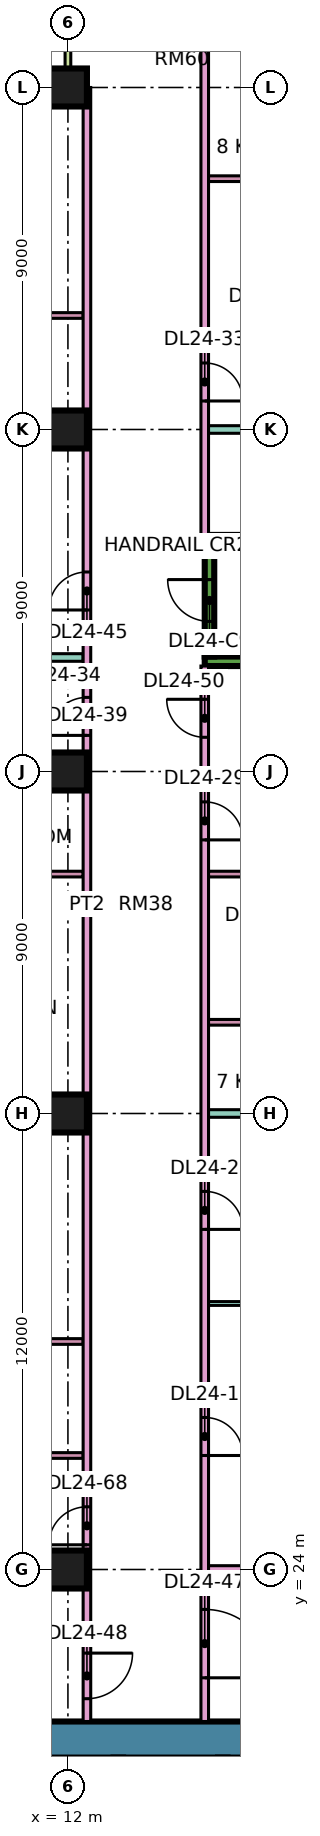
"""IFC4 building model, lengths in metres.
Left out: names, types, materials, properties, quantities, classifications, styles, units other than length and angle.
Written with IfcOpenShell. Run it as: python <this file> out.ifc"""

import sys

from ifc_helpers import new_model, si_unit, direction, frame, frame_2d, origin, origin_2d, place, context, subcontext, project, spatial, rectangle, extrude, element, fill, save


model = new_model("IFC4")
c1 = context("Model", 3, precision=1e-05, world=origin(), true_north=direction((0.0, 1.0)))
c2 = subcontext(c1, "Body", "Model", "MODEL_VIEW")
j1 = project(units=[si_unit("LENGTHUNIT", "METRE"), si_unit("PLANEANGLEUNIT", "RADIAN")], contexts=[c1])
p1 = place(None, origin())
s1 = spatial("IfcSite", under=j1, at=p1, CompositionType="ELEMENT")
p2 = place(p1, origin())
s2 = spatial("IfcBuilding", under=s1, at=p2, CompositionType="ELEMENT")
p3 = place(p2, frame((0.0, 0.0, 106.9)))
s3 = spatial("IfcBuildingStorey", under=s2, at=p3, CompositionType="ELEMENT", Elevation=106.9)
for number, where, z_axis, x_axis in (
    (1, (12.0, 24.0, 0.0), (0.0, 0.0, 1.0), (1.0, 0.0, 0.0)),
    (2, (12.0, 36.0, 0.0), (0.0, 0.0, 1.0), (1.0, 0.0, 0.0)),
    (3, (12.0, 45.0, 0.0), (0.0, 0.0, 1.0), (1.0, 0.0, 0.0)),
    (4, (12.0, 54.0, 0.0), (0.0, 0.0, 1.0), (1.0, 0.0, 0.0)),
    (5, (12.0, 63.0, 0.0), (0.0, 0.0, 1.0), (1.0, 0.0, 0.0)),
):
    element("IfcColumn", number, at=place(p3, frame(where, z_axis=z_axis, x_axis=x_axis)), inside=s3, PredefinedType="COLUMN", context=c2, shape_type="SweptSolid", body=[
        extrude(rectangle(XDim=1.0, YDim=1.0, at=origin_2d()), origin(), (0.0, 0.0, 1.0), 3.75),
    ])
p4 = place(p3, frame((9.0, 19.525, 0.0), z_axis=(0.0, 0.0, 1.0), x_axis=(1.0, 0.0, 0.0)))
e6 = element("IfcWall", 6, at=p4, inside=s3, PredefinedType="SHEAR", context=c2, shape_type="SweptSolid", body=[
    extrude(rectangle(XDim=25.0, YDim=0.95, at=frame_2d((12.5, 0.0))), origin(), (0.0, 0.0, 1.0), 3.75),
])
p5 = place(p4, frame((19.1, 0.0, 0.0)))
e7 = element("IfcOpeningElement", 7, at=p5, cuts=e6, PredefinedType="OPENING", context=c2, shape_type="SweptSolid", body=[
    extrude(rectangle(XDim=1.8, YDim=2.4, at=frame_2d((0.9, 1.2))), frame((0.0, 0.485, 0.0), z_axis=(0.0, -1.0, 0.0), x_axis=(1.0, 0.0, 0.0)), (0.0, 0.0, 1.0), 0.97),
])
for number, where, z_axis, x_axis in (
    (8, (15.6, 47.9, 0.0), (0.0, 0.0, 1.0), (1.0, 0.0, 0.0)),
    (9, (15.6, 51.1, 0.0), (0.0, 0.0, 1.0), (1.0, 0.0, 0.0)),
):
    element("IfcWall", number, at=place(p3, frame(where, z_axis=z_axis, x_axis=x_axis)), inside=s3, PredefinedType="SHEAR", context=c2, shape_type="SweptSolid", body=[
        extrude(rectangle(XDim=7.0, YDim=0.25, at=frame_2d((3.5, 0.0))), origin(), (0.0, 0.0, 1.0), 3.75),
    ])
p6 = place(p3, frame((15.725, 48.025, 0.0), z_axis=(0.0, 0.0, 1.0), x_axis=(0.0, 1.0, 0.0)))
e10 = element("IfcWall", 10, at=p6, inside=s3, PredefinedType="SHEAR", context=c2, shape_type="SweptSolid", body=[
    extrude(rectangle(XDim=2.95, YDim=0.25, at=frame_2d((1.475, 0.0))), origin(), (0.0, 0.0, 1.0), 3.75),
])
p7 = place(p6, frame((0.925, 0.0, 0.0)))
e11 = element("IfcOpeningElement", 11, at=p7, cuts=e10, PredefinedType="OPENING", context=c2, shape_type="SweptSolid", body=[
    extrude(rectangle(XDim=1.1, YDim=2.2, at=frame_2d((0.55, 1.1))), frame((0.0, 0.135, 0.0), z_axis=(0.0, -1.0, 0.0), x_axis=(1.0, 0.0, 0.0)), (0.0, 0.0, 1.0), 0.27),
])
p8 = place(p3, frame((11.925, 63.0, 0.0), z_axis=(0.0, 0.0, 1.0), x_axis=(-1.0, 0.0, 0.0)))
e12 = element("IfcWall", 12, at=p8, inside=s3, PredefinedType="SOLIDWALL", context=c2, shape_type="SweptSolid", body=[
    extrude(rectangle(XDim=10.35, YDim=0.15, at=frame_2d((5.175, 0.0))), origin(), (0.0, 0.0, 1.0), 3.35),
])
p9 = place(p8, frame((1.175, 0.0, 0.45)))
e13 = element("IfcOpeningElement", 13, at=p9, cuts=e12, PredefinedType="OPENING", context=c2, shape_type="SweptSolid", body=[
    extrude(rectangle(XDim=3.0, YDim=2.4, at=frame_2d((1.5, 1.2))), frame((0.0, 0.085, 0.0), z_axis=(0.0, -1.0, 0.0), x_axis=(1.0, 0.0, 0.0)), (0.0, 0.0, 1.0), 0.17),
])
p10 = place(p8, frame((7.288, 0.0, 0.0)))
e14 = element("IfcOpeningElement", 14, at=p10, cuts=e12, PredefinedType="OPENING", context=c2, shape_type="SweptSolid", body=[
    extrude(rectangle(XDim=1.8, YDim=2.4, at=frame_2d((0.9, 1.2))), frame((0.0, 0.085, 0.0), z_axis=(0.0, -1.0, 0.0), x_axis=(1.0, 0.0, 0.0)), (0.0, 0.0, 1.0), 0.17),
])
p11 = place(p3, frame((12.0, 64.5, 0.0), z_axis=(0.0, 0.0, 1.0), x_axis=(0.0, -1.0, 0.0)))
e15 = element("IfcWall", 15, at=p11, inside=s3, PredefinedType="SOLIDWALL", context=c2, shape_type="SweptSolid", body=[
    extrude(rectangle(XDim=1.5, YDim=0.15, at=frame_2d((0.75, 0.0))), origin(), (0.0, 0.0, 1.0), 3.35),
])
p12 = place(p3, frame((-1.35, 22.4, 0.0), z_axis=(0.0, 0.0, 1.0), x_axis=(1.0, 0.0, 0.0)))
e16 = element("IfcWall", 16, at=p12, inside=s3, PredefinedType="PARTITIONING", context=c2, shape_type="SweptSolid", body=[
    extrude(rectangle(XDim=13.75, YDim=0.2, at=frame_2d((6.875, 0.0))), origin(), (0.0, 0.0, 1.0), 3.35),
])
p13 = place(p3, frame((0.0, 36.0, 0.0), z_axis=(0.0, 0.0, 1.0), x_axis=(1.0, 0.0, 0.0)))
e17 = element("IfcWall", 17, at=p13, inside=s3, PredefinedType="PARTITIONING", context=c2, shape_type="SweptSolid", body=[
    extrude(rectangle(XDim=12.4, YDim=0.2, at=frame_2d((6.2, 0.0))), origin(), (0.0, 0.0, 1.0), 3.35),
])
p14 = place(p3, frame((0.0, 48.0, 0.0), z_axis=(0.0, 0.0, 1.0), x_axis=(1.0, 0.0, 0.0)))
e18 = element("IfcWall", 18, at=p14, inside=s3, PredefinedType="PARTITIONING", context=c2, shape_type="SweptSolid", body=[
    extrude(rectangle(XDim=12.4, YDim=0.2, at=frame_2d((6.2, 0.0))), origin(), (0.0, 0.0, 1.0), 3.35),
])
for number, where, z_axis, x_axis in (
    (19, (7.175, 27.0, 0.0), (0.0, 0.0, 1.0), (1.0, 0.0, 0.0)),
    (20, (7.175, 30.0, 0.0), (0.0, 0.0, 1.0), (1.0, 0.0, 0.0)),
    (21, (7.175, 53.7, 0.0), (0.0, 0.0, 1.0), (1.0, 0.0, 0.0)),
    (22, (7.175, 57.0, 0.0), (0.0, 0.0, 1.0), (1.0, 0.0, 0.0)),
):
    element("IfcWall", number, at=place(p3, frame(where, z_axis=z_axis, x_axis=x_axis)), inside=s3, PredefinedType="PARTITIONING", context=c2, shape_type="SweptSolid", body=[
        extrude(rectangle(XDim=5.225, YDim=0.15, at=frame_2d((2.612, 0.0))), origin(), (0.0, 0.0, 1.0), 3.35),
    ])
p15 = place(p3, frame((8.375, 42.3, 0.0), z_axis=(0.0, 0.0, 1.0), x_axis=(1.0, 0.0, 0.0)))
e23 = element("IfcWall", 23, at=p15, inside=s3, PredefinedType="PARTITIONING", context=c2, shape_type="SweptSolid", body=[
    extrude(rectangle(XDim=4.025, YDim=0.15, at=frame_2d((2.012, 0.0))), origin(), (0.0, 0.0, 1.0), 3.35),
])
p16 = place(p3, frame((8.375, 45.0, 0.0), z_axis=(0.0, 0.0, 1.0), x_axis=(1.0, 0.0, 0.0)))
e24 = element("IfcWall", 24, at=p16, inside=s3, PredefinedType="PARTITIONING", context=c2, shape_type="SweptSolid", body=[
    extrude(rectangle(XDim=4.025, YDim=0.15, at=frame_2d((2.012, 0.0))), origin(), (0.0, 0.0, 1.0), 3.35),
])
p17 = place(p16, frame((1.575, 0.0, 0.0)))
e25 = element("IfcOpeningElement", 25, at=p17, cuts=e24, PredefinedType="OPENING", context=c2, shape_type="SweptSolid", body=[
    extrude(rectangle(XDim=0.8, YDim=2.1, at=frame_2d((0.4, 1.05))), frame((0.0, 0.085, 0.0), z_axis=(0.0, -1.0, 0.0), x_axis=(1.0, 0.0, 0.0)), (0.0, 0.0, 1.0), 0.17),
])
p18 = place(p3, frame((12.5, 20.0, 0.0), z_axis=(0.0, 0.0, 1.0), x_axis=(0.0, 1.0, 0.0)))
e26 = element("IfcWall", 26, at=p18, inside=s3, PredefinedType="PARTITIONING", context=c2, shape_type="SweptSolid", body=[
    extrude(rectangle(XDim=43.0, YDim=0.2, at=frame_2d((21.5, 0.0))), origin(), (0.0, 0.0, 1.0), 3.35),
])
p19 = place(p18, frame((25.95, 0.0, 0.0)))
e27 = element("IfcOpeningElement", 27, at=p19, cuts=e26, PredefinedType="OPENING", context=c2, shape_type="SweptSolid", body=[
    extrude(rectangle(XDim=1.0, YDim=2.1, at=frame_2d((0.5, 1.05))), frame((0.0, 0.11, 0.0), z_axis=(0.0, -1.0, 0.0), x_axis=(1.0, 0.0, 0.0)), (0.0, 0.0, 1.0), 0.22),
])
p20 = place(p18, frame((29.25, 0.0, 0.0)))
e28 = element("IfcOpeningElement", 28, at=p20, cuts=e26, PredefinedType="OPENING", context=c2, shape_type="SweptSolid", body=[
    extrude(rectangle(XDim=1.0, YDim=2.1, at=frame_2d((0.5, 1.05))), frame((0.0, 0.11, 0.0), z_axis=(0.0, -1.0, 0.0), x_axis=(1.0, 0.0, 0.0)), (0.0, 0.0, 1.0), 0.22),
])
p21 = place(p18, frame((0.6, 0.0, 0.0)))
e29 = element("IfcOpeningElement", 29, at=p21, cuts=e26, PredefinedType="OPENING", context=c2, shape_type="SweptSolid", body=[
    extrude(rectangle(XDim=1.2, YDim=2.1, at=frame_2d((0.6, 1.05))), frame((0.0, 0.11, 0.0), z_axis=(0.0, -1.0, 0.0), x_axis=(1.0, 0.0, 0.0)), (0.0, 0.0, 1.0), 0.22),
])
p22 = place(p18, frame((4.65, 0.0, 0.0)))
e30 = element("IfcOpeningElement", 30, at=p22, cuts=e26, PredefinedType="OPENING", context=c2, shape_type="SweptSolid", body=[
    extrude(rectangle(XDim=1.0, YDim=2.1, at=frame_2d((0.5, 1.05))), frame((0.0, 0.11, 0.0), z_axis=(0.0, -1.0, 0.0), x_axis=(1.0, 0.0, 0.0)), (0.0, 0.0, 1.0), 0.22),
])
p23 = place(p3, frame((15.6, 20.0, 0.0), z_axis=(0.0, 0.0, 1.0), x_axis=(0.0, 1.0, 0.0)))
e31 = element("IfcWall", 31, at=p23, inside=s3, PredefinedType="PARTITIONING", context=c2, shape_type="SweptSolid", body=[
    extrude(rectangle(XDim=27.775, YDim=0.2, at=frame_2d((13.887, 0.0))), origin(), (0.0, 0.0, 1.0), 3.35),
])
p24 = place(p23, frame((7.0, 0.0, 0.0)))
e32 = element("IfcOpeningElement", 32, at=p24, cuts=e31, PredefinedType="OPENING", context=c2, shape_type="SweptSolid", body=[
    extrude(rectangle(XDim=1.0, YDim=2.1, at=frame_2d((0.5, 1.05))), frame((0.0, 0.11, 0.0), z_axis=(0.0, -1.0, 0.0), x_axis=(1.0, 0.0, 0.0)), (0.0, 0.0, 1.0), 0.22),
])
p25 = place(p23, frame((12.95, 0.0, 0.0)))
e33 = element("IfcOpeningElement", 33, at=p25, cuts=e31, PredefinedType="OPENING", context=c2, shape_type="SweptSolid", body=[
    extrude(rectangle(XDim=1.0, YDim=2.1, at=frame_2d((0.5, 1.05))), frame((0.0, 0.11, 0.0), z_axis=(0.0, -1.0, 0.0), x_axis=(1.0, 0.0, 0.0)), (0.0, 0.0, 1.0), 0.22),
])
p26 = place(p23, frame((23.2, 0.0, 0.0)))
e34 = element("IfcOpeningElement", 34, at=p26, cuts=e31, PredefinedType="OPENING", context=c2, shape_type="SweptSolid", body=[
    extrude(rectangle(XDim=1.0, YDim=2.1, at=frame_2d((0.5, 1.05))), frame((0.0, 0.11, 0.0), z_axis=(0.0, -1.0, 0.0), x_axis=(1.0, 0.0, 0.0)), (0.0, 0.0, 1.0), 0.22),
])
p27 = place(p23, frame((1.15, 0.0, 0.0)))
e35 = element("IfcOpeningElement", 35, at=p27, cuts=e31, PredefinedType="OPENING", context=c2, shape_type="SweptSolid", body=[
    extrude(rectangle(XDim=1.8, YDim=2.1, at=frame_2d((0.9, 1.05))), frame((0.0, 0.11, 0.0), z_axis=(0.0, -1.0, 0.0), x_axis=(1.0, 0.0, 0.0)), (0.0, 0.0, 1.0), 0.22),
])
p28 = place(p23, frame((25.9, 0.0, 0.0)))
e36 = element("IfcOpeningElement", 36, at=p28, cuts=e31, PredefinedType="OPENING", context=c2, shape_type="SweptSolid", body=[
    extrude(rectangle(XDim=1.0, YDim=2.1, at=frame_2d((0.5, 1.05))), frame((0.0, 0.11, 0.0), z_axis=(0.0, -1.0, 0.0), x_axis=(1.0, 0.0, 0.0)), (0.0, 0.0, 1.0), 0.22),
])
p29 = place(p3, frame((15.6, 51.225, 0.0), z_axis=(0.0, 0.0, 1.0), x_axis=(0.0, 1.0, 0.0)))
e37 = element("IfcWall", 37, at=p29, inside=s3, PredefinedType="PARTITIONING", context=c2, shape_type="SweptSolid", body=[
    extrude(rectangle(XDim=13.125, YDim=0.2, at=frame_2d((6.562, 0.0))), origin(), (0.0, 0.0, 1.0), 3.35),
])
p30 = place(p29, frame((3.525, 0.0, 0.0)))
e38 = element("IfcOpeningElement", 38, at=p30, cuts=e37, PredefinedType="OPENING", context=c2, shape_type="SweptSolid", body=[
    extrude(rectangle(XDim=1.0, YDim=2.1, at=frame_2d((0.5, 1.05))), frame((0.0, 0.11, 0.0), z_axis=(0.0, -1.0, 0.0), x_axis=(1.0, 0.0, 0.0)), (0.0, 0.0, 1.0), 0.22),
])
p31 = place(p3, frame((15.7, 24.0, 0.0), z_axis=(0.0, 0.0, 1.0), x_axis=(1.0, 0.0, 0.0)))
e39 = element("IfcWall", 39, at=p31, inside=s3, PredefinedType="PARTITIONING", context=c2, shape_type="SweptSolid", body=[
    extrude(rectangle(XDim=5.8, YDim=0.2, at=frame_2d((2.9, 0.0))), origin(), (0.0, 0.0, 1.0), 3.35),
])
p32 = place(p3, frame((15.7, 31.0, 0.0), z_axis=(0.0, 0.0, 1.0), x_axis=(1.0, 0.0, 0.0)))
e40 = element("IfcWall", 40, at=p32, inside=s3, PredefinedType="PARTITIONING", context=c2, shape_type="SweptSolid", body=[
    extrude(rectangle(XDim=5.8, YDim=0.1, at=frame_2d((2.9, 0.0))), origin(), (0.0, 0.0, 1.0), 3.35),
])
p33 = place(p3, frame((15.7, 36.0, 0.0), z_axis=(0.0, 0.0, 1.0), x_axis=(1.0, 0.0, 0.0)))
e41 = element("IfcWall", 41, at=p33, inside=s3, PredefinedType="PARTITIONING", context=c2, shape_type="SweptSolid", body=[
    extrude(rectangle(XDim=8.3, YDim=0.2, at=frame_2d((4.15, 0.0))), origin(), (0.0, 0.0, 1.0), 3.35),
])
p34 = place(p3, frame((15.7, 38.4, 0.0), z_axis=(0.0, 0.0, 1.0), x_axis=(1.0, 0.0, 0.0)))
e42 = element("IfcWall", 42, at=p34, inside=s3, PredefinedType="PARTITIONING", context=c2, shape_type="SweptSolid", body=[
    extrude(rectangle(XDim=3.125, YDim=0.15, at=frame_2d((1.562, 0.0))), origin(), (0.0, 0.0, 1.0), 3.35),
])
p35 = place(p3, frame((15.7, 42.3, 0.0), z_axis=(0.0, 0.0, 1.0), x_axis=(1.0, 0.0, 0.0)))
e43 = element("IfcWall", 43, at=p35, inside=s3, PredefinedType="PARTITIONING", context=c2, shape_type="SweptSolid", body=[
    extrude(rectangle(XDim=3.125, YDim=0.15, at=frame_2d((1.562, 0.0))), origin(), (0.0, 0.0, 1.0), 3.35),
])
p36 = place(p35, frame((1.1, 0.0, 0.0)))
e44 = element("IfcOpeningElement", 44, at=p36, cuts=e43, PredefinedType="OPENING", context=c2, shape_type="SweptSolid", body=[
    extrude(rectangle(XDim=0.8, YDim=2.1, at=frame_2d((0.4, 1.05))), frame((0.0, 0.085, 0.0), z_axis=(0.0, -1.0, 0.0), x_axis=(1.0, 0.0, 0.0)), (0.0, 0.0, 1.0), 0.17),
])
p37 = place(p3, frame((15.7, 45.0, 0.0), z_axis=(0.0, 0.0, 1.0), x_axis=(1.0, 0.0, 0.0)))
e45 = element("IfcWall", 45, at=p37, inside=s3, PredefinedType="PARTITIONING", context=c2, shape_type="SweptSolid", body=[
    extrude(rectangle(XDim=8.3, YDim=0.2, at=frame_2d((4.15, 0.0))), origin(), (0.0, 0.0, 1.0), 3.35),
])
p38 = place(p3, frame((15.7, 54.0, 0.0), z_axis=(0.0, 0.0, 1.0), x_axis=(1.0, 0.0, 0.0)))
e46 = element("IfcWall", 46, at=p38, inside=s3, PredefinedType="PARTITIONING", context=c2, shape_type="SweptSolid", body=[
    extrude(rectangle(XDim=8.226, YDim=0.2, at=frame_2d((4.113, 0.0))), origin(), (0.0, 0.0, 1.0), 3.35),
])
p39 = place(p3, frame((15.7, 56.4, 0.0), z_axis=(0.0, 0.0, 1.0), x_axis=(1.0, 0.0, 0.0)))
e47 = element("IfcWall", 47, at=p39, inside=s3, PredefinedType="PARTITIONING", context=c2, shape_type="SweptSolid", body=[
    extrude(rectangle(XDim=3.125, YDim=0.15, at=frame_2d((1.562, 0.0))), origin(), (0.0, 0.0, 1.0), 3.35),
])
p40 = place(p39, frame((1.2, 0.0, 0.0)))
e48 = element("IfcOpeningElement", 48, at=p40, cuts=e47, PredefinedType="OPENING", context=c2, shape_type="SweptSolid", body=[
    extrude(rectangle(XDim=0.8, YDim=2.1, at=frame_2d((0.4, 1.05))), frame((0.0, 0.085, 0.0), z_axis=(0.0, -1.0, 0.0), x_axis=(1.0, 0.0, 0.0)), (0.0, 0.0, 1.0), 0.17),
])
p41 = place(p3, frame((15.7, 60.6, 0.0), z_axis=(0.0, 0.0, 1.0), x_axis=(1.0, 0.0, 0.0)))
e49 = element("IfcWall", 49, at=p41, inside=s3, PredefinedType="PARTITIONING", context=c2, shape_type="SweptSolid", body=[
    extrude(rectangle(XDim=3.125, YDim=0.15, at=frame_2d((1.562, 0.0))), origin(), (0.0, 0.0, 1.0), 3.35),
])
p42 = place(p7, frame((1.1, 0.0, 0.0), z_axis=(0.0, 0.0, 1.0), x_axis=(-1.0, 0.0, 0.0)))
e50 = element("IfcDoor", 50, at=p42, inside=s3, OperationType="SINGLE_SWING_RIGHT", PredefinedType="DOOR", context=c2, shape_type="SweptSolid", body=[
    extrude(rectangle(XDim=1.1, YDim=2.2, at=frame_2d((0.55, 1.1))), frame((0.0, 0.025, 0.0), z_axis=(0.0, -1.0, 0.0), x_axis=(1.0, 0.0, 0.0)), (0.0, 0.0, 1.0), 0.05),
])
fill(e11, e50)
p43 = place(p24, frame((1.0, 0.0, 0.0), z_axis=(0.0, 0.0, 1.0), x_axis=(-1.0, 0.0, 0.0)))
e51 = element("IfcDoor", 51, at=p43, inside=s3, OperationType="SINGLE_SWING_LEFT", PredefinedType="DOOR", context=c2, shape_type="SweptSolid", body=[
    extrude(rectangle(XDim=1.0, YDim=2.1, at=frame_2d((0.5, 1.05))), frame((0.0, 0.025, 0.0), z_axis=(0.0, -1.0, 0.0), x_axis=(1.0, 0.0, 0.0)), (0.0, 0.0, 1.0), 0.05),
])
fill(e32, e51)
p44 = place(p25, frame((1.0, 0.0, 0.0), z_axis=(0.0, 0.0, 1.0), x_axis=(-1.0, 0.0, 0.0)))
e52 = element("IfcDoor", 52, at=p44, inside=s3, OperationType="SINGLE_SWING_LEFT", PredefinedType="DOOR", context=c2, shape_type="SweptSolid", body=[
    extrude(rectangle(XDim=1.0, YDim=2.1, at=frame_2d((0.5, 1.05))), frame((0.0, 0.025, 0.0), z_axis=(0.0, -1.0, 0.0), x_axis=(1.0, 0.0, 0.0)), (0.0, 0.0, 1.0), 0.05),
])
fill(e33, e52)
p45 = place(p26, frame((1.0, 0.0, 0.0), z_axis=(0.0, 0.0, 1.0), x_axis=(-1.0, 0.0, 0.0)))
e53 = element("IfcDoor", 53, at=p45, inside=s3, OperationType="SINGLE_SWING_LEFT", PredefinedType="DOOR", context=c2, shape_type="SweptSolid", body=[
    extrude(rectangle(XDim=1.0, YDim=2.1, at=frame_2d((0.5, 1.05))), frame((0.0, 0.025, 0.0), z_axis=(0.0, -1.0, 0.0), x_axis=(1.0, 0.0, 0.0)), (0.0, 0.0, 1.0), 0.05),
])
fill(e34, e53)
p46 = place(p30, frame((1.0, 0.0, 0.0), z_axis=(0.0, 0.0, 1.0), x_axis=(-1.0, 0.0, 0.0)))
e54 = element("IfcDoor", 54, at=p46, inside=s3, OperationType="SINGLE_SWING_LEFT", PredefinedType="DOOR", context=c2, shape_type="SweptSolid", body=[
    extrude(rectangle(XDim=1.0, YDim=2.1, at=frame_2d((0.5, 1.05))), frame((0.0, 0.025, 0.0), z_axis=(0.0, -1.0, 0.0), x_axis=(1.0, 0.0, 0.0)), (0.0, 0.0, 1.0), 0.05),
])
fill(e38, e54)
p47 = place(p19, origin())
e55 = element("IfcDoor", 55, at=p47, inside=s3, OperationType="SINGLE_SWING_LEFT", PredefinedType="DOOR", context=c2, shape_type="SweptSolid", body=[
    extrude(rectangle(XDim=1.0, YDim=2.1, at=frame_2d((0.5, 1.05))), frame((0.0, 0.025, 0.0), z_axis=(0.0, -1.0, 0.0), x_axis=(1.0, 0.0, 0.0)), (0.0, 0.0, 1.0), 0.05),
])
fill(e27, e55)
p48 = place(p20, origin())
e56 = element("IfcDoor", 56, at=p48, inside=s3, OperationType="SINGLE_SWING_LEFT", PredefinedType="DOOR", context=c2, shape_type="SweptSolid", body=[
    extrude(rectangle(XDim=1.0, YDim=2.1, at=frame_2d((0.5, 1.05))), frame((0.0, 0.025, 0.0), z_axis=(0.0, -1.0, 0.0), x_axis=(1.0, 0.0, 0.0)), (0.0, 0.0, 1.0), 0.05),
])
fill(e28, e56)
p49 = place(p27, frame((1.8, 0.0, 0.0), z_axis=(0.0, 0.0, 1.0), x_axis=(-1.0, 0.0, 0.0)))
e57 = element("IfcDoor", 57, at=p49, inside=s3, OperationType="DOUBLE_DOOR_SINGLE_SWING", PredefinedType="DOOR", context=c2, shape_type="SweptSolid", body=[
    extrude(rectangle(XDim=1.8, YDim=2.1, at=frame_2d((0.9, 1.05))), frame((0.0, 0.025, 0.0), z_axis=(0.0, -1.0, 0.0), x_axis=(1.0, 0.0, 0.0)), (0.0, 0.0, 1.0), 0.05),
])
fill(e35, e57)
p50 = place(p21, origin())
e58 = element("IfcDoor", 58, at=p50, inside=s3, OperationType="SINGLE_SWING_RIGHT", PredefinedType="DOOR", context=c2, shape_type="SweptSolid", body=[
    extrude(rectangle(XDim=1.2, YDim=2.1, at=frame_2d((0.6, 1.05))), frame((0.0, 0.025, 0.0), z_axis=(0.0, -1.0, 0.0), x_axis=(1.0, 0.0, 0.0)), (0.0, 0.0, 1.0), 0.05),
])
fill(e29, e58)
p51 = place(p28, frame((1.0, 0.0, 0.0), z_axis=(0.0, 0.0, 1.0), x_axis=(-1.0, 0.0, 0.0)))
e59 = element("IfcDoor", 59, at=p51, inside=s3, OperationType="SINGLE_SWING_RIGHT", PredefinedType="DOOR", context=c2, shape_type="SweptSolid", body=[
    extrude(rectangle(XDim=1.0, YDim=2.1, at=frame_2d((0.5, 1.05))), frame((0.0, 0.025, 0.0), z_axis=(0.0, -1.0, 0.0), x_axis=(1.0, 0.0, 0.0)), (0.0, 0.0, 1.0), 0.05),
])
fill(e36, e59)
p52 = place(p22, origin())
e60 = element("IfcDoor", 60, at=p52, inside=s3, OperationType="SINGLE_SWING_LEFT", PredefinedType="DOOR", context=c2, shape_type="SweptSolid", body=[
    extrude(rectangle(XDim=1.0, YDim=2.1, at=frame_2d((0.5, 1.05))), frame((0.0, 0.025, 0.0), z_axis=(0.0, -1.0, 0.0), x_axis=(1.0, 0.0, 0.0)), (0.0, 0.0, 1.0), 0.05),
])
fill(e30, e60)
save(model, sys.argv[1])
